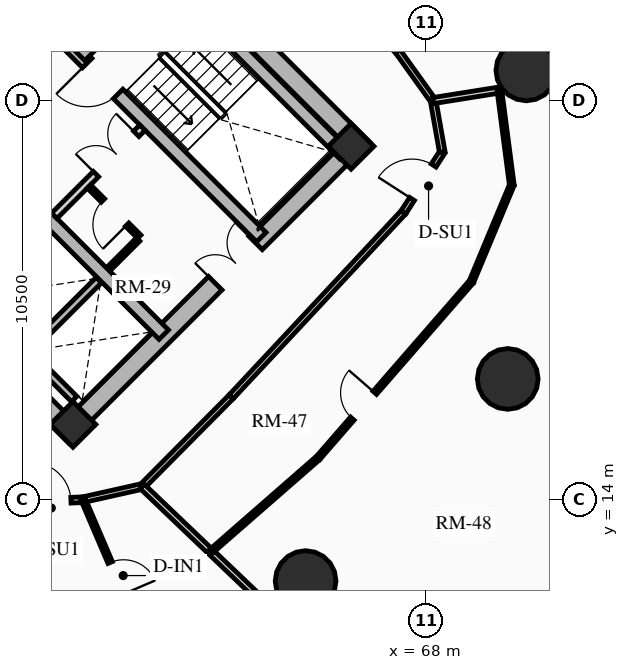
"""IFC4 building model, lengths in metres.
Left out: names, types, materials, properties, quantities, classifications, styles, units other than length and angle.
Written with IfcOpenShell. Run it as: python <this file> out.ifc"""

import sys

from ifc_helpers import new_model, si_unit, direction, frame, frame_2d, origin, origin_2d, place, context, subcontext, project, spatial, rectangle, circle, extrude, source, transform, mapped, element, fill, save


model = new_model("IFC4")
c1 = context("Model", 3, precision=1e-05, world=origin(), true_north=direction((0.0, 1.0)))
c2 = subcontext(c1, "Body", "Model", "MODEL_VIEW")
j1 = project(units=[si_unit("LENGTHUNIT", "METRE"), si_unit("PLANEANGLEUNIT", "RADIAN")], contexts=[c1])
p1 = place(None, origin())
s1 = spatial("IfcSite", under=j1, at=p1, CompositionType="ELEMENT")
p2 = place(p1, origin())
s2 = spatial("IfcBuilding", under=s1, at=p2, CompositionType="ELEMENT")
p3 = place(p2, frame((0.0, 0.0, 54.01)))
s3 = spatial("IfcBuildingStorey", under=s2, at=p3, CompositionType="ELEMENT", Elevation=54.01)
for number, where, z_axis, x_axis in (
    (1, (58.773, 15.661, 0.0), (0.0, 0.0, 1.0), (-0.707, 0.707, 0.0)),
    (2, (66.339, 23.227, 0.0), (0.0, 0.0, 1.0), (-0.707, 0.707, 0.0)),
):
    element("IfcWall", number, at=place(p3, frame(where, z_axis=z_axis, x_axis=x_axis)), inside=s3, PredefinedType="SHEAR", context=c2, shape_type="SweptSolid", body=[
        extrude(rectangle(XDim=14.3, YDim=0.5, at=frame_2d((7.15, 0.0))), origin(), (0.0, 0.0, 1.0), 2.91),
    ])
p4 = place(p3, frame((58.596, 15.838, 0.0), z_axis=(0.0, 0.0, 1.0), x_axis=(0.707106781187, 0.707106781187, 0.0)))
e3 = element("IfcWall", 3, at=p4, inside=s3, PredefinedType="SHEAR", context=c2, shape_type="SweptSolid", body=[
    extrude(rectangle(XDim=10.7, YDim=0.5, at=frame_2d((5.35, 0.0))), origin(), (0.0, 0.0, 1.0), 2.91),
])
m1 = source(origin(), c2, "Body", "SweptSolid", [
    extrude(rectangle(XDim=1.5, YDim=2.02, at=frame_2d((0.75, 1.01))), frame((0.0, 0.26, 0.0), z_axis=(0.0, -1.0, 0.0), x_axis=(1.0, 0.0, 0.0)), (0.0, 0.0, 1.0), 0.52),
])
p5 = place(p4, frame((5.45, 0.0, 0.0)))
e4 = element("IfcOpeningElement", 4, at=p5, cuts=e3, PredefinedType="OPENING", context=c2, shape_type="MappedRepresentation", body=[
    mapped(m1, transform((0.0, 0.0, 0.0), x_axis=(1.0, 0.0, 0.0), y_axis=(0.0, 1.0, 0.0), z_axis=(0.0, 0.0, 1.0), scale=1.0)),
])
p6 = place(p3, frame((61.096, 18.338, 0.0), z_axis=(0.0, 0.0, 1.0), x_axis=(-0.707106781187, 0.707106781187, 0.0)))
e5 = element("IfcWall", 5, at=p6, inside=s3, PredefinedType="SHEAR", context=c2, shape_type="SweptSolid", body=[
    extrude(rectangle(XDim=13.8, YDim=0.35, at=frame_2d((6.9, 0.0))), origin(), (0.0, 0.0, 1.0), 2.91),
])
m2 = source(origin(), c2, "Body", "SweptSolid", [
    extrude(rectangle(XDim=1.1, YDim=2.015, at=frame_2d((0.55, 1.007))), frame((0.0, 0.185, 0.0), z_axis=(0.0, -1.0, 0.0), x_axis=(1.0, 0.0, 0.0)), (0.0, 0.0, 1.0), 0.37),
])
p7 = place(p6, frame((4.9, 0.0, 0.0)))
e6 = element("IfcOpeningElement", 6, at=p7, cuts=e5, PredefinedType="OPENING", context=c2, shape_type="MappedRepresentation", body=[
    mapped(m2, transform((0.0, 0.0, 0.0), x_axis=(1.0, 0.0, 0.0), y_axis=(0.0, 1.0, 0.0), z_axis=(0.0, 0.0, 1.0), scale=1.0)),
])
m3 = source(origin(), c2, "Body", "SweptSolid", [
    extrude(rectangle(XDim=1.15, YDim=2.02, at=frame_2d((0.575, 1.01))), frame((0.0, 0.185, 0.0), z_axis=(0.0, -1.0, 0.0), x_axis=(1.0, 0.0, 0.0)), (0.0, 0.0, 1.0), 0.37),
])
p8 = place(p6, frame((7.32, 0.0, 0.0)))
e7 = element("IfcOpeningElement", 7, at=p8, cuts=e5, PredefinedType="OPENING", context=c2, shape_type="MappedRepresentation", body=[
    mapped(m3, transform((0.0, 0.0, 0.0), x_axis=(1.0, 0.0, 0.0), y_axis=(0.0, 1.0, 0.0), z_axis=(0.0, 0.0, 1.0), scale=1.0)),
])
p9 = place(p3, frame((63.662, 20.904, 0.0), z_axis=(0.0, 0.0, 1.0), x_axis=(-0.707106781187, 0.707106781187, 0.0)))
e8 = element("IfcWall", 8, at=p9, inside=s3, PredefinedType="SHEAR", context=c2, shape_type="SweptSolid", body=[
    extrude(rectangle(XDim=13.8, YDim=0.35, at=frame_2d((6.9, 0.0))), origin(), (0.0, 0.0, 1.0), 2.91),
])
p10 = place(p9, frame((10.025, 0.0, 0.0)))
e9 = element("IfcOpeningElement", 9, at=p10, cuts=e8, PredefinedType="OPENING", context=c2, shape_type="MappedRepresentation", body=[
    mapped(m2, transform((0.0, 0.0, 0.0), x_axis=(1.0, 0.0, 0.0), y_axis=(0.0, 1.0, 0.0), z_axis=(0.0, 0.0, 1.0), scale=1.0)),
])
p11 = place(p9, frame((12.025, 0.0, 0.0)))
e10 = element("IfcOpeningElement", 10, at=p11, cuts=e8, PredefinedType="OPENING", context=c2, shape_type="MappedRepresentation", body=[
    mapped(m2, transform((0.0, 0.0, 0.0), x_axis=(1.0, 0.0, 0.0), y_axis=(0.0, 1.0, 0.0), z_axis=(0.0, 0.0, 1.0), scale=1.0)),
])
p12 = place(p9, frame((5.33, 0.0, 0.0)))
e11 = element("IfcOpeningElement", 11, at=p12, cuts=e8, PredefinedType="OPENING", context=c2, shape_type="MappedRepresentation", body=[
    mapped(m3, transform((0.0, 0.0, 0.0), x_axis=(1.0, 0.0, 0.0), y_axis=(0.0, 1.0, 0.0), z_axis=(0.0, 0.0, 1.0), scale=1.0)),
])
p13 = place(p3, frame((65.847, 23.089, 0.0), z_axis=(0.0, 0.0, 1.0), x_axis=(-0.707106781187, 0.707106781187, 0.0)))
e12 = element("IfcWall", 12, at=p13, inside=s3, PredefinedType="SHEAR", context=c2, shape_type="SweptSolid", body=[
    extrude(rectangle(XDim=6.745, YDim=0.35, at=frame_2d((3.373, 0.0))), origin(), (0.0, 0.0, 1.0), 2.91),
])
p14 = place(p3, frame((58.893, 25.674, 0.0), z_axis=(0.0, 0.0, 1.0), x_axis=(0.707106781187, 0.707106781187, 0.0)))
e13 = element("IfcWall", 13, at=p14, inside=s3, PredefinedType="SHEAR", context=c2, shape_type="SweptSolid", body=[
    extrude(rectangle(XDim=3.285, YDim=0.35, at=frame_2d((1.643, 0.0))), origin(), (0.0, 0.0, 1.0), 2.91),
])
for number, where, z_axis, x_axis in (
    (14, (58.706, 15.976, 0.0), (0.0, 0.0, 1.0), (0.707, 0.707, 0.0)),
    (15, (66.024, 23.294, 0.0), (0.0, 0.0, 1.0), (0.707, 0.707, 0.0)),
):
    element("IfcColumn", number, at=place(p3, frame(where, z_axis=z_axis, x_axis=x_axis)), inside=s3, PredefinedType="COLUMN", context=c2, shape_type="SweptSolid", body=[
        extrude(rectangle(XDim=0.85, YDim=0.85, at=origin_2d()), origin(), (0.0, 0.0, 1.0), 2.91),
    ])
for number, where, z_axis, x_axis in (
    (16, (64.827, 11.854, 0.0), (0.0, 0.0, 1.0), (1.0, 0.0, 0.0)),
    (17, (70.146, 17.173, 0.0), (0.0, 0.0, 1.0), (1.0, 0.0, 0.0)),
    (18, (70.635, 25.291, 0.0), (0.0, 0.0, 1.0), (1.0, 0.0, 0.0)),
):
    element("IfcColumn", number, at=place(p3, frame(where, z_axis=z_axis, x_axis=x_axis)), inside=s3, PredefinedType="USERDEFINED", context=c2, shape_type="SweptSolid", body=[
        extrude(circle(Radius=0.8, at=origin_2d()), origin(), (0.0, 0.0, 1.0), 2.91),
    ])
p15 = place(p3, frame((73.814, 15.031, 0.0), z_axis=(0.0, 0.0, 1.0), x_axis=(-0.559638693991, -0.828736708604, 0.0)))
e19 = element("IfcWall", 19, at=p15, inside=s3, PredefinedType="SOLIDWALL", context=c2, shape_type="SweptSolid", body=[
    extrude(rectangle(XDim=4.93, YDim=0.24, at=frame_2d((2.465, 0.0))), origin(), (0.0, 0.0, 1.0), 2.073),
])
m4 = source(origin(), c2, "Body", "SweptSolid", [
    extrude(rectangle(XDim=1.9, YDim=1.35, at=frame_2d((0.95, 0.675))), frame((0.0, 0.13, 0.0), z_axis=(0.0, -1.0, 0.0), x_axis=(1.0, 0.0, 0.0)), (0.0, 0.0, 1.0), 0.26),
])
p16 = place(p15, frame((1.515, 0.0, 0.65)))
e20 = element("IfcOpeningElement", 20, at=p16, cuts=e19, PredefinedType="OPENING", context=c2, shape_type="MappedRepresentation", body=[
    mapped(m4, transform((0.0, 0.0, 0.0), x_axis=(1.0, 0.0, 0.0), y_axis=(0.0, 1.0, 0.0), z_axis=(0.0, 0.0, 1.0), scale=1.0)),
])
p17 = place(p3, frame((57.284, 17.673, 0.0), z_axis=(0.0, 0.0, 1.0), x_axis=(0.707147878904, 0.70706568108, 0.0)))
e21 = element("IfcWall", 21, at=p17, inside=s3, PredefinedType="SHEAR", context=c2, shape_type="SweptSolid", body=[
    extrude(rectangle(XDim=2.97, YDim=0.2, at=frame_2d((1.485, 0.0))), origin(), (0.0, 0.0, 1.0), 2.91),
])
p18 = place(p3, frame((58.737, 16.644, 0.0), z_axis=(0.0, 0.0, 1.0), x_axis=(-0.707032117043, 0.707181437447, 0.0)))
e22 = element("IfcWall", 22, at=p18, inside=s3, PredefinedType="SHEAR", context=c2, shape_type="SweptSolid", body=[
    extrude(rectangle(XDim=1.635, YDim=0.2, at=frame_2d((0.817, 0.0))), origin(), (0.0, 0.0, 1.0), 2.91),
])
p19 = place(p3, frame((58.214, 21.467, 0.0), z_axis=(0.0, 0.0, 1.0), x_axis=(0.707106781187, 0.707106781187, 0.0)))
e23 = element("IfcWall", 23, at=p19, inside=s3, PredefinedType="PARTITIONING", context=c2, shape_type="SweptSolid", body=[
    extrude(rectangle(XDim=3.28, YDim=0.2, at=frame_2d((1.64, 0.0))), origin(), (0.0, 0.0, 1.0), 2.635),
])
m5 = source(origin(), c2, "Body", "SweptSolid", [
    extrude(rectangle(XDim=1.5, YDim=2.02, at=frame_2d((0.75, 1.01))), frame((0.0, 0.11, 0.0), z_axis=(0.0, -1.0, 0.0), x_axis=(1.0, 0.0, 0.0)), (0.0, 0.0, 1.0), 0.22),
])
p20 = place(p19, frame((1.55, 0.0, 0.0)))
e24 = element("IfcOpeningElement", 24, at=p20, cuts=e23, PredefinedType="OPENING", context=c2, shape_type="MappedRepresentation", body=[
    mapped(m5, transform((0.0, 0.0, 0.0), x_axis=(1.0, 0.0, 0.0), y_axis=(0.0, 1.0, 0.0), z_axis=(0.0, 0.0, 1.0), scale=1.0)),
])
p21 = place(p3, frame((60.448, 20.915, 0.0), z_axis=(0.0, 0.0, 1.0), x_axis=(-0.707106781187, 0.707106781187, 0.0)))
e25 = element("IfcWall", 25, at=p21, inside=s3, PredefinedType="PARTITIONING", context=c2, shape_type="SweptSolid", body=[
    extrude(rectangle(XDim=1.87, YDim=0.125, at=frame_2d((0.935, 0.0))), origin(), (0.0, 0.0, 1.0), 2.635),
])
m6 = source(origin(), c2, "Body", "SweptSolid", [
    extrude(rectangle(XDim=0.9, YDim=2.005, at=frame_2d((0.45, 1.002))), frame((0.0, 0.073, 0.0), z_axis=(0.0, -1.0, 0.0), x_axis=(1.0, 0.0, 0.0)), (0.0, 0.0, 1.0), 0.145),
])
p22 = place(p21, frame((0.45, 0.0, 0.0)))
e26 = element("IfcOpeningElement", 26, at=p22, cuts=e25, PredefinedType="OPENING", context=c2, shape_type="MappedRepresentation", body=[
    mapped(m6, transform((0.0, 0.0, 0.0), x_axis=(1.0, 0.0, 0.0), y_axis=(0.0, 1.0, 0.0), z_axis=(0.0, 0.0, 1.0), scale=1.0)),
])
p23 = place(p3, frame((59.643, 20.066, 0.0), z_axis=(0.0, 0.0, 1.0), x_axis=(0.707106781187, 0.707106781187, 0.0)))
e27 = element("IfcWall", 27, at=p23, inside=s3, PredefinedType="PARTITIONING", context=c2, shape_type="SweptSolid", body=[
    extrude(rectangle(XDim=1.1, YDim=0.125, at=frame_2d((0.55, 0.0))), origin(), (0.0, 0.0, 1.0), 2.635),
])
p24 = place(p3, frame((57.483, 13.925, 0.0), z_axis=(0.0, 0.0, 1.0), x_axis=(0.998884345706, 0.047223552414, 0.0)))
e28 = element("IfcWall", 28, at=p24, inside=s3, PredefinedType="PARTITIONING", context=c2, shape_type="SweptSolid", body=[
    extrude(rectangle(XDim=1.494, YDim=0.15, at=frame_2d((0.747, 0.0))), origin(), (0.0, 0.0, 1.0), 2.159),
])
m7 = source(origin(), c2, "Body", "SweptSolid", [
    extrude(rectangle(XDim=1.05, YDim=2.015, at=frame_2d((0.525, 1.007))), frame((0.0, 0.085, 0.0), z_axis=(0.0, -1.0, 0.0), x_axis=(1.0, 0.0, 0.0)), (0.0, 0.0, 1.0), 0.17),
])
p25 = place(p24, frame((0.12, 0.0, 0.0)))
e29 = element("IfcOpeningElement", 29, at=p25, cuts=e28, PredefinedType="OPENING", context=c2, shape_type="MappedRepresentation", body=[
    mapped(m7, transform((0.0, 0.0, 0.0), x_axis=(1.0, 0.0, 0.0), y_axis=(0.0, 1.0, 0.0), z_axis=(0.0, 0.0, 1.0), scale=1.0)),
])
p26 = place(p3, frame((58.975, 13.996, 0.0), z_axis=(0.0, 0.0, 1.0), x_axis=(0.975700857392, 0.219106907431, 0.0)))
e30 = element("IfcWall", 30, at=p26, inside=s3, PredefinedType="PARTITIONING", context=c2, shape_type="SweptSolid", body=[
    extrude(rectangle(XDim=1.591, YDim=0.15, at=frame_2d((0.795, 0.0))), origin(), (0.0, 0.0, 1.0), 2.205),
])
p27 = place(p3, frame((60.528, 14.344, 0.0), z_axis=(0.0, 0.0, 1.0), x_axis=(0.704381645997, 0.709821454158, 0.0)))
e31 = element("IfcWall", 31, at=p27, inside=s3, PredefinedType="PARTITIONING", context=c2, shape_type="SweptSolid", body=[
    extrude(rectangle(XDim=3.321, YDim=0.15, at=frame_2d((1.661, 0.0))), origin(), (0.0, 0.0, 1.0), 2.159),
])
p28 = place(p3, frame((62.867, 16.702, 0.0), z_axis=(0.0, 0.0, 1.0), x_axis=(0.682449206191, 0.73093302085, 0.0)))
e32 = element("IfcWall", 32, at=p28, inside=s3, PredefinedType="PARTITIONING", context=c2, shape_type="SweptSolid", body=[
    extrude(rectangle(XDim=6.642, YDim=0.15, at=frame_2d((3.321, 0.0))), origin(), (0.0, 0.0, 1.0), 2.159),
])
p29 = place(p3, frame((67.4, 21.556, 0.0), z_axis=(0.0, 0.0, 1.0), x_axis=(0.542247692187, 0.840218686009, 0.0)))
e33 = element("IfcWall", 33, at=p29, inside=s3, PredefinedType="PARTITIONING", context=c2, shape_type="SweptSolid", body=[
    extrude(rectangle(XDim=1.887, YDim=0.15, at=frame_2d((0.943, 0.0))), origin(), (0.0, 0.0, 1.0), 2.205),
])
p30 = place(p29, frame((0.419, 0.0, 0.0)))
e34 = element("IfcOpeningElement", 34, at=p30, cuts=e33, PredefinedType="OPENING", context=c2, shape_type="MappedRepresentation", body=[
    mapped(m7, transform((0.0, 0.0, 0.0), x_axis=(1.0, 0.0, 0.0), y_axis=(0.0, 1.0, 0.0), z_axis=(0.0, 0.0, 1.0), scale=1.0)),
])
p31 = place(p3, frame((68.423, 23.142, 0.0), z_axis=(0.0, 0.0, 1.0), x_axis=(-0.174796562349, 0.984604571283, 0.0)))
e35 = element("IfcWall", 35, at=p31, inside=s3, PredefinedType="PARTITIONING", context=c2, shape_type="SweptSolid", body=[
    extrude(rectangle(XDim=1.377, YDim=0.15, at=frame_2d((0.688, 0.0))), origin(), (0.0, 0.0, 1.0), 2.159),
])
p32 = place(p3, frame((68.182, 24.498, 0.0), z_axis=(0.0, 0.0, 1.0), x_axis=(-0.582532339525, 0.812807525437, 0.0)))
e36 = element("IfcWall", 36, at=p32, inside=s3, PredefinedType="PARTITIONING", context=c2, shape_type="SweptSolid", body=[
    extrude(rectangle(XDim=1.605, YDim=0.15, at=frame_2d((0.803, 0.0))), origin(), (0.0, 0.0, 1.0), 2.205),
])
p33 = place(p3, frame((67.247, 25.802, 0.0), z_axis=(0.0, 0.0, 1.0), x_axis=(-0.696771261687, 0.71729339108, 0.0)))
e37 = element("IfcWall", 37, at=p33, inside=s3, PredefinedType="PARTITIONING", context=c2, shape_type="SweptSolid", body=[
    extrude(rectangle(XDim=5.972, YDim=0.15, at=frame_2d((2.986, 0.0))), origin(), (0.0, 0.0, 1.0), 2.635),
])
m8 = source(origin(), c2, "Body", "SweptSolid", [
    extrude(rectangle(XDim=1.0, YDim=2.015, at=frame_2d((0.5, 1.007))), frame((0.0, 0.085, 0.0), z_axis=(0.0, -1.0, 0.0), x_axis=(1.0, 0.0, 0.0)), (0.0, 0.0, 1.0), 0.17),
])
p34 = place(p33, frame((2.486, 0.0, 0.0)))
e38 = element("IfcOpeningElement", 38, at=p34, cuts=e37, PredefinedType="OPENING", context=c2, shape_type="MappedRepresentation", body=[
    mapped(m8, transform((0.0, 0.0, 0.0), x_axis=(1.0, 0.0, 0.0), y_axis=(0.0, 1.0, 0.0), z_axis=(0.0, 0.0, 1.0), scale=1.0)),
])
p35 = place(p3, frame((60.528, 14.344, 0.0), z_axis=(0.0, 0.0, 1.0), x_axis=(0.723320016743, -0.690512963947, 0.0)))
e39 = element("IfcWall", 39, at=p35, inside=s3, PredefinedType="PARTITIONING", context=c2, shape_type="SweptSolid", body=[
    extrude(rectangle(XDim=8.893, YDim=0.16, at=frame_2d((4.446, 0.0))), origin(), (0.0, 0.0, 1.0), 2.073),
])
p36 = place(p3, frame((68.182, 24.498, 0.0), z_axis=(0.0, 0.0, 1.0), x_axis=(0.987550107246, 0.157304754152, 0.0)))
e40 = element("IfcWall", 40, at=p36, inside=s3, PredefinedType="PARTITIONING", context=c2, shape_type="SweptSolid", body=[
    extrude(rectangle(XDim=6.304, YDim=0.16, at=frame_2d((3.152, 0.0))), origin(), (0.0, 0.0, 1.0), 2.073),
])
p37 = place(p3, frame((58.975, 13.996, 0.0), z_axis=(0.0, 0.0, 1.0), x_axis=(0.393755664375, -0.919215141723, 0.0)))
e41 = element("IfcWall", 41, at=p37, inside=s3, PredefinedType="PARTITIONING", context=c2, shape_type="SweptSolid", body=[
    extrude(rectangle(XDim=7.563, YDim=0.125, at=frame_2d((3.782, 0.0))), origin(), (0.0, 0.0, 1.0), 2.073),
])
p38 = place(p37, frame((1.8, 0.0, 0.0)))
e42 = element("IfcOpeningElement", 42, at=p38, cuts=e41, PredefinedType="OPENING", context=c2, shape_type="MappedRepresentation", body=[
    mapped(m6, transform((0.0, 0.0, 0.0), x_axis=(1.0, 0.0, 0.0), y_axis=(0.0, 1.0, 0.0), z_axis=(0.0, 0.0, 1.0), scale=1.0)),
])
p39 = place(p3, frame((62.329, 12.625, 0.0), z_axis=(0.0, 0.0, 1.0), x_axis=(0.753237140985, 0.657749047465, 0.0)))
e43 = element("IfcWall", 43, at=p39, inside=s3, PredefinedType="PARTITIONING", context=c2, shape_type="SweptSolid", body=[
    extrude(rectangle(XDim=3.753, YDim=0.125, at=frame_2d((1.877, 0.0))), origin(), (0.0, 0.0, 1.0), 2.159),
])
p40 = place(p3, frame((65.156, 15.094, 0.0), z_axis=(0.0, 0.0, 1.0), x_axis=(0.656356662483, 0.754450748302, 0.0)))
e44 = element("IfcWall", 44, at=p40, inside=s3, PredefinedType="PARTITIONING", context=c2, shape_type="SweptSolid", body=[
    extrude(rectangle(XDim=6.147, YDim=0.125, at=frame_2d((3.074, 0.0))), origin(), (0.0, 0.0, 1.0), 2.159),
])
p41 = place(p40, frame((1.372, 0.0, 0.0)))
e45 = element("IfcOpeningElement", 45, at=p41, cuts=e44, PredefinedType="OPENING", context=c2, shape_type="MappedRepresentation", body=[
    mapped(m6, transform((0.0, 0.0, 0.0), x_axis=(1.0, 0.0, 0.0), y_axis=(0.0, 1.0, 0.0), z_axis=(0.0, 0.0, 1.0), scale=1.0)),
])
p42 = place(p3, frame((69.191, 19.732, 0.0), z_axis=(0.0, 0.0, 1.0), x_axis=(0.385156247749, 0.922851377427, 0.0)))
e46 = element("IfcWall", 46, at=p42, inside=s3, PredefinedType="PARTITIONING", context=c2, shape_type="SweptSolid", body=[
    extrude(rectangle(XDim=2.756, YDim=0.125, at=frame_2d((1.378, 0.0))), origin(), (0.0, 0.0, 1.0), 2.205),
])
p43 = place(p3, frame((70.252, 22.275, 0.0), z_axis=(0.0, 0.0, 1.0), x_axis=(-0.129645482902, 0.991560411051, 0.0)))
e47 = element("IfcWall", 47, at=p43, inside=s3, PredefinedType="PARTITIONING", context=c2, shape_type="SweptSolid", body=[
    extrude(rectangle(XDim=2.521, YDim=0.125, at=frame_2d((1.261, 0.0))), origin(), (0.0, 0.0, 1.0), 2.635),
])
m9 = source(origin(), c2, "Body", "SweptSolid", [
    extrude(rectangle(XDim=1.15, YDim=2.02, at=frame_2d((0.575, 1.01))), frame((0.0, 0.025, 0.0), z_axis=(0.0, -1.0, 0.0), x_axis=(1.0, 0.0, 0.0)), (0.0, 0.0, 1.0), 0.05),
])
p44 = place(p12, origin())
e48 = element("IfcDoor", 48, at=p44, inside=s3, OperationType="SINGLE_SWING_RIGHT", PredefinedType="DOOR", context=c2, shape_type="MappedRepresentation", body=[
    mapped(m9, transform((0.0, 0.0, 0.0), x_axis=(1.0, 0.0, 0.0), y_axis=(0.0, 1.0, 0.0), z_axis=(0.0, 0.0, 1.0), scale=1.0)),
])
fill(e11, e48)
m10 = source(origin(), c2, "Body", "SweptSolid", [
    extrude(rectangle(XDim=1.5, YDim=2.02, at=frame_2d((0.75, 1.01))), frame((0.0, 0.025, 0.0), z_axis=(0.0, -1.0, 0.0), x_axis=(1.0, 0.0, 0.0)), (0.0, 0.0, 1.0), 0.05),
])
p45 = place(p5, origin())
e49 = element("IfcDoor", 49, at=p45, inside=s3, OperationType="DOUBLE_DOOR_SINGLE_SWING", PredefinedType="DOOR", context=c2, shape_type="MappedRepresentation", body=[
    mapped(m10, transform((0.0, 0.0, 0.0), x_axis=(1.0, 0.0, 0.0), y_axis=(0.0, 1.0, 0.0), z_axis=(0.0, 0.0, 1.0), scale=1.0)),
])
fill(e4, e49)
p46 = place(p20, origin())
e50 = element("IfcDoor", 50, at=p46, inside=s3, OperationType="DOUBLE_DOOR_SINGLE_SWING", PredefinedType="DOOR", context=c2, shape_type="MappedRepresentation", body=[
    mapped(m10, transform((0.0, 0.0, 0.0), x_axis=(1.0, 0.0, 0.0), y_axis=(0.0, 1.0, 0.0), z_axis=(0.0, 0.0, 1.0), scale=1.0)),
])
fill(e24, e50)
m11 = source(origin(), c2, "Body", "SweptSolid", [
    extrude(rectangle(XDim=0.9, YDim=2.005, at=frame_2d((0.45, 1.002))), frame((0.0, 0.025, 0.0), z_axis=(0.0, -1.0, 0.0), x_axis=(1.0, 0.0, 0.0)), (0.0, 0.0, 1.0), 0.05),
])
p47 = place(p22, origin())
e51 = element("IfcDoor", 51, at=p47, inside=s3, OperationType="SINGLE_SWING_LEFT", PredefinedType="DOOR", context=c2, shape_type="MappedRepresentation", body=[
    mapped(m11, transform((0.0, 0.0, 0.0), x_axis=(1.0, 0.0, 0.0), y_axis=(0.0, 1.0, 0.0), z_axis=(0.0, 0.0, 1.0), scale=1.0)),
])
fill(e26, e51)
m12 = source(origin(), c2, "Body", "SweptSolid", [
    extrude(rectangle(XDim=1.05, YDim=2.015, at=frame_2d((0.525, 1.007))), frame((0.0, 0.025, 0.0), z_axis=(0.0, -1.0, 0.0), x_axis=(1.0, 0.0, 0.0)), (0.0, 0.0, 1.0), 0.05),
])
p48 = place(p25, origin())
e52 = element("IfcDoor", 52, at=p48, inside=s3, OperationType="SINGLE_SWING_LEFT", PredefinedType="DOOR", context=c2, shape_type="MappedRepresentation", body=[
    mapped(m12, transform((0.0, 0.0, 0.0), x_axis=(1.0, 0.0, 0.0), y_axis=(0.0, 1.0, 0.0), z_axis=(0.0, 0.0, 1.0), scale=1.0)),
])
fill(e29, e52)
p49 = place(p38, origin())
e53 = element("IfcDoor", 53, at=p49, inside=s3, OperationType="SINGLE_SWING_RIGHT", PredefinedType="DOOR", context=c2, shape_type="MappedRepresentation", body=[
    mapped(m11, transform((0.0, 0.0, 0.0), x_axis=(1.0, 0.0, 0.0), y_axis=(0.0, 1.0, 0.0), z_axis=(0.0, 0.0, 1.0), scale=1.0)),
])
fill(e42, e53)
p50 = place(p30, origin())
e54 = element("IfcDoor", 54, at=p50, inside=s3, OperationType="SINGLE_SWING_LEFT", PredefinedType="DOOR", context=c2, shape_type="MappedRepresentation", body=[
    mapped(m12, transform((0.0, 0.0, 0.0), x_axis=(1.0, 0.0, 0.0), y_axis=(0.0, 1.0, 0.0), z_axis=(0.0, 0.0, 1.0), scale=1.0)),
])
fill(e34, e54)
p51 = place(p41, origin())
e55 = element("IfcDoor", 55, at=p51, inside=s3, OperationType="SINGLE_SWING_RIGHT", PredefinedType="DOOR", context=c2, shape_type="MappedRepresentation", body=[
    mapped(m11, transform((0.0, 0.0, 0.0), x_axis=(1.0, 0.0, 0.0), y_axis=(0.0, 1.0, 0.0), z_axis=(0.0, 0.0, 1.0), scale=1.0)),
])
fill(e45, e55)
save(model, sys.argv[1])
